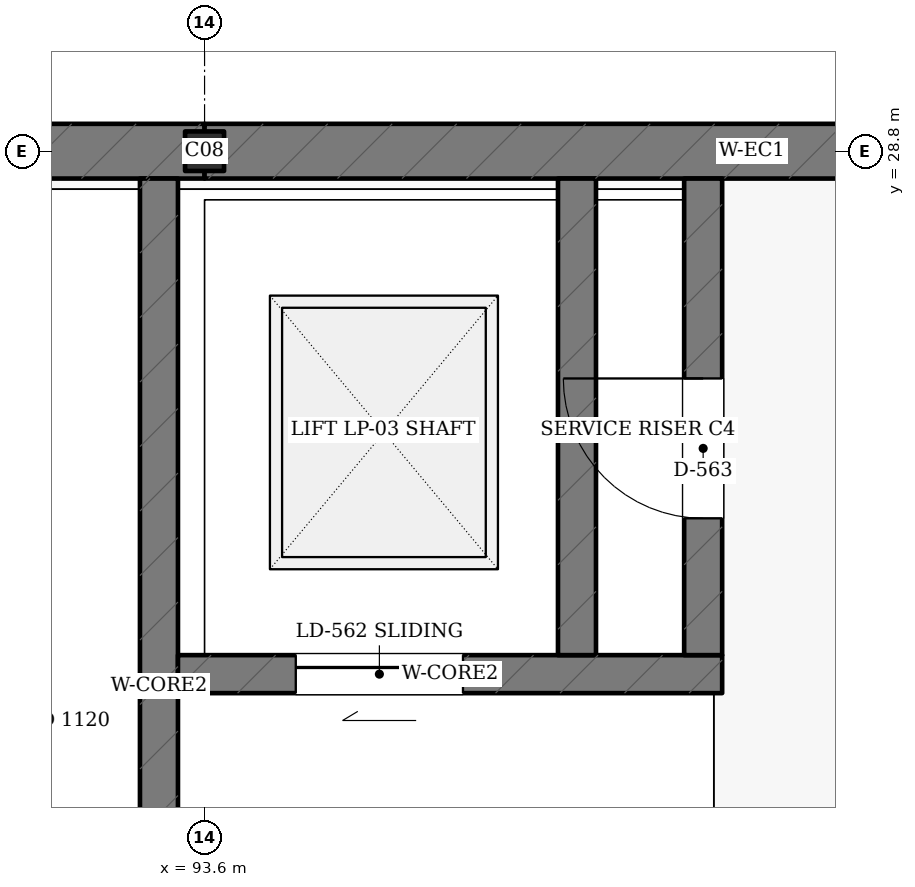
"""IFC4 building model, lengths in metres.
Left out: names, types, materials, properties, quantities, classifications, styles, units other than length and angle.
Written with IfcOpenShell. Run it as: python <this file> out.ifc"""

import sys

from ifc_helpers import new_model, si_unit, direction, frame, frame_2d, origin, origin_2d, place, context, subcontext, project, spatial, rectangle, i_section, extrude, element, fill, save


model = new_model("IFC4")
c1 = context("Model", 3, precision=1e-05, world=origin(), true_north=direction((0.0, 1.0)))
c2 = subcontext(c1, "Body", "Model", "MODEL_VIEW")
j1 = project(units=[si_unit("LENGTHUNIT", "METRE"), si_unit("PLANEANGLEUNIT", "RADIAN")], contexts=[c1])
p1 = place(None, origin())
s1 = spatial("IfcSite", under=j1, at=p1, CompositionType="ELEMENT")
p2 = place(p1, origin())
s2 = spatial("IfcBuilding", under=s1, at=p2, CompositionType="ELEMENT")
p3 = place(p2, frame((0.0, 0.0, 5.4)))
s3 = spatial("IfcBuildingStorey", under=s2, at=p3, CompositionType="ELEMENT", Elevation=5.4)
p4 = place(p3, frame((93.6, 28.8, 0.0), z_axis=(0.0, 0.0, 1.0), x_axis=(1.0, 0.0, 0.0)))
e1 = element("IfcColumn", 1, at=p4, inside=s3, PredefinedType="COLUMN", context=c2, shape_type="SweptSolid", body=[
    extrude(i_section(OverallWidth=0.256, OverallDepth=0.26, WebThickness=0.01, FlangeThickness=0.017, FilletRadius=0.013, at=origin_2d()), origin(), (0.0, 0.0, 1.0), 4.5),
])
p5 = place(p3, frame((86.4, 28.8, 0.0), z_axis=(0.0, 0.0, 1.0), x_axis=(1.0, 0.0, 0.0)))
e2 = element("IfcWall", 2, at=p5, inside=s3, PredefinedType="SHEAR", context=c2, shape_type="SweptSolid", body=[
    extrude(rectangle(XDim=7.2, YDim=0.36, at=frame_2d((3.6, 0.0))), origin(), (0.0, 0.0, 1.0), 3.58),
])
p6 = place(p3, frame((93.6, 28.8, 0.0), z_axis=(0.0, 0.0, 1.0), x_axis=(1.0, 0.0, 0.0)))
e3 = element("IfcWall", 3, at=p6, inside=s3, PredefinedType="SHEAR", context=c2, shape_type="SweptSolid", body=[
    extrude(rectangle(XDim=7.2, YDim=0.36, at=frame_2d((3.6, 0.0))), origin(), (0.0, 0.0, 1.0), 3.43),
])
p7 = place(p3, frame((93.3, 21.95, 0.0), z_axis=(0.0, 0.0, 1.0), x_axis=(0.0, 1.0, 0.0)))
e4 = element("IfcWall", 4, at=p7, inside=s3, PredefinedType="SHEAR", context=c2, shape_type="SweptSolid", body=[
    extrude(rectangle(XDim=6.67, YDim=0.25, at=frame_2d((3.335, 0.0))), origin(), (0.0, 0.0, 1.0), 3.55),
])
p8 = place(p7, frame((0.95, 0.0, 0.0)))
e5 = element("IfcOpeningElement", 5, at=p8, cuts=e4, PredefinedType="OPENING", context=c2, shape_type="SweptSolid", body=[
    extrude(rectangle(XDim=1.35, YDim=2.15, at=frame_2d((0.675, 1.075))), frame((0.0, 0.135, 0.0), z_axis=(0.0, -1.0, 0.0), x_axis=(1.0, 0.0, 0.0)), (0.0, 0.0, 1.0), 0.27),
])
p9 = place(p3, frame((93.425, 25.36, 0.0), z_axis=(0.0, 0.0, 1.0), x_axis=(1.0, 0.0, 0.0)))
e6 = element("IfcWall", 6, at=p9, inside=s3, PredefinedType="SHEAR", context=c2, shape_type="SweptSolid", body=[
    extrude(rectangle(XDim=3.58, YDim=0.25, at=frame_2d((1.79, 0.0))), origin(), (0.0, 0.0, 1.0), 3.55),
])
p10 = place(p9, frame((0.775, 0.0, 0.0)))
e7 = element("IfcOpeningElement", 7, at=p10, cuts=e6, PredefinedType="OPENING", context=c2, shape_type="SweptSolid", body=[
    extrude(rectangle(XDim=1.1, YDim=2.15, at=frame_2d((0.55, 1.075))), frame((0.0, 0.135, 0.0), z_axis=(0.0, -1.0, 0.0), x_axis=(1.0, 0.0, 0.0)), (0.0, 0.0, 1.0), 0.27),
])
p11 = place(p3, frame((96.05, 25.485, 0.0), z_axis=(0.0, 0.0, 1.0), x_axis=(0.0, 1.0, 0.0)))
e8 = element("IfcWall", 8, at=p11, inside=s3, PredefinedType="SHEAR", context=c2, shape_type="SweptSolid", body=[
    extrude(rectangle(XDim=3.135, YDim=0.25, at=frame_2d((1.567, 0.0))), origin(), (0.0, 0.0, 1.0), 3.55),
])
p12 = place(p3, frame((96.88, 25.485, 0.0), z_axis=(0.0, 0.0, 1.0), x_axis=(0.0, 1.0, 0.0)))
e9 = element("IfcWall", 9, at=p12, inside=s3, PredefinedType="SHEAR", context=c2, shape_type="SweptSolid", body=[
    extrude(rectangle(XDim=3.135, YDim=0.25, at=frame_2d((1.567, 0.0))), origin(), (0.0, 0.0, 1.0), 3.55),
])
p13 = place(p12, frame((0.9, 0.0, 0.0)))
e10 = element("IfcOpeningElement", 10, at=p13, cuts=e9, PredefinedType="OPENING", context=c2, shape_type="SweptSolid", body=[
    extrude(rectangle(XDim=0.92, YDim=2.05, at=frame_2d((0.46, 1.025))), frame((0.0, 0.135, 0.0), z_axis=(0.0, -1.0, 0.0), x_axis=(1.0, 0.0, 0.0)), (0.0, 0.0, 1.0), 0.27),
])
p14 = place(p10, origin())
e11 = element("IfcDoor", 11, at=p14, inside=s3, OperationType="SLIDING_TO_LEFT", PredefinedType="DOOR", context=c2, shape_type="SweptSolid", body=[
    extrude(rectangle(XDim=1.1, YDim=2.15, at=frame_2d((0.55, 1.075))), frame((0.0, 0.025, 0.0), z_axis=(0.0, -1.0, 0.0), x_axis=(1.0, 0.0, 0.0)), (0.0, 0.0, 1.0), 0.05),
])
fill(e7, e11)
p15 = place(p13, origin())
e12 = element("IfcDoor", 12, at=p15, inside=s3, OperationType="SINGLE_SWING_RIGHT", PredefinedType="DOOR", context=c2, shape_type="SweptSolid", body=[
    extrude(rectangle(XDim=0.92, YDim=2.05, at=frame_2d((0.46, 1.025))), frame((0.0, 0.025, 0.0), z_axis=(0.0, -1.0, 0.0), x_axis=(1.0, 0.0, 0.0)), (0.0, 0.0, 1.0), 0.05),
])
fill(e10, e12)
save(model, sys.argv[1])
